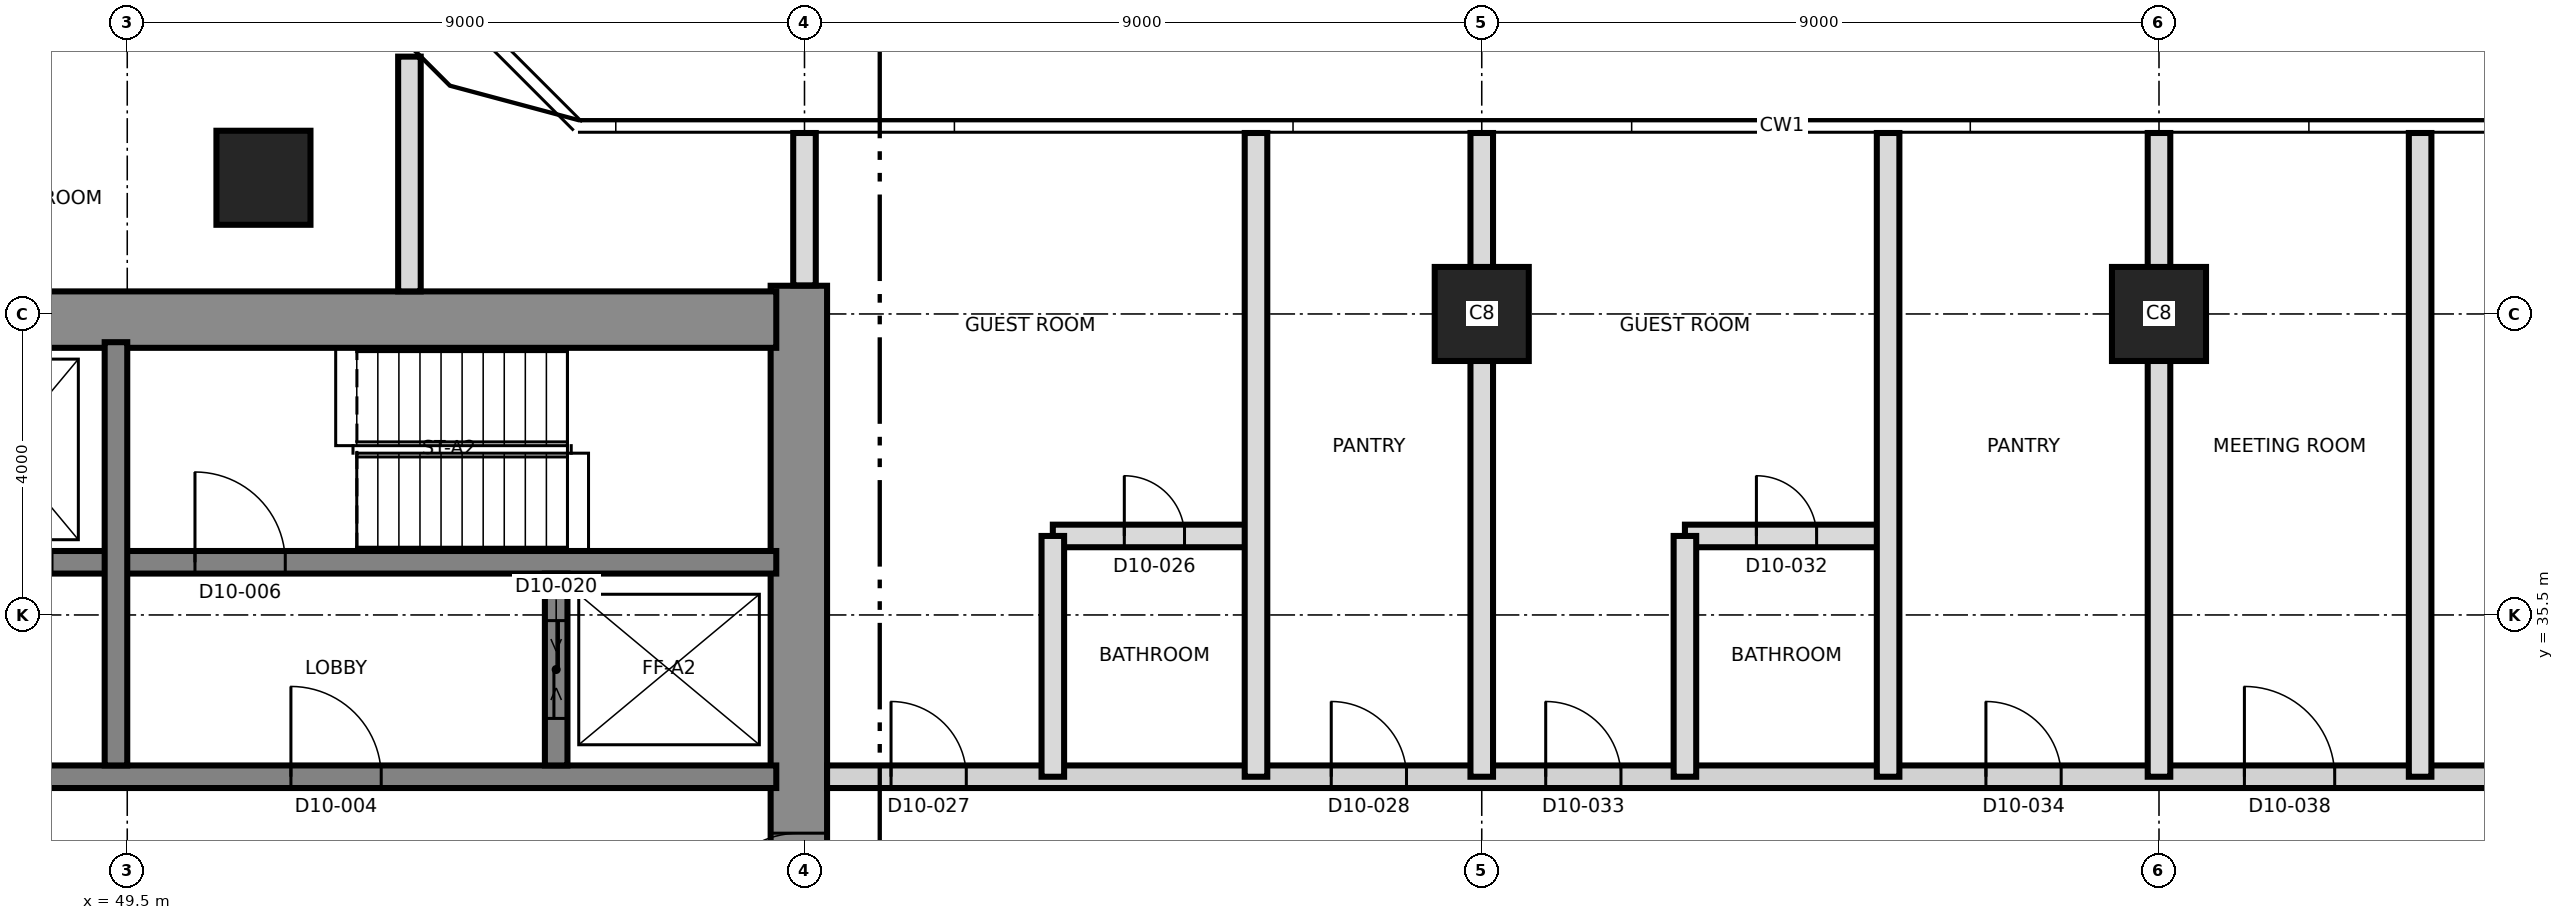
"""IFC4 building model, lengths in metres.
Left out: names, types, materials, properties, quantities, classifications, styles, units other than length and angle.
Written with IfcOpenShell. Run it as: python <this file> out.ifc"""

import sys

from ifc_helpers import new_model, si_unit, direction, frame, frame_2d, origin, origin_2d, place, context, subcontext, project, spatial, rectangle, extrude, element, fill, save


model = new_model("IFC4")
c1 = context("Model", 3, precision=1e-05, world=origin(), true_north=direction((0.0, 1.0)))
c2 = subcontext(c1, "Body", "Model", "MODEL_VIEW")
j1 = project(units=[si_unit("LENGTHUNIT", "METRE"), si_unit("PLANEANGLEUNIT", "RADIAN")], contexts=[c1])
p1 = place(None, origin())
s1 = spatial("IfcSite", under=j1, at=p1, CompositionType="ELEMENT")
p2 = place(p1, origin())
s2 = spatial("IfcBuilding", under=s1, at=p2, CompositionType="ELEMENT")
p3 = place(p2, frame((0.0, 0.0, 120.4)))
s3 = spatial("IfcBuildingStorey", under=s2, at=p3, CompositionType="ELEMENT", Elevation=120.4)
p4 = place(p3, frame((58.425, 21.125, 0.0), z_axis=(0.0, 0.0, 1.0), x_axis=(0.0, 1.0, 0.0)))
e1 = element("IfcWall", 1, at=p4, inside=s3, PredefinedType="SHEAR", context=c2, shape_type="SweptSolid", body=[
    extrude(rectangle(XDim=18.75, YDim=0.75, at=frame_2d((9.375, 0.0))), origin(), (0.0, 0.0, 1.0), 3.7),
])
p5 = place(p4, frame((10.275, 0.0, 0.0)))
e2 = element("IfcOpeningElement", 2, at=p5, cuts=e1, PredefinedType="OPENING", context=c2, shape_type="SweptSolid", body=[
    extrude(rectangle(XDim=1.2, YDim=2.1, at=frame_2d((0.6, 1.05))), frame((0.0, 0.385, 0.0), z_axis=(0.0, -1.0, 0.0), x_axis=(1.0, 0.0, 0.0)), (0.0, 0.0, 1.0), 0.77),
])
p6 = place(p3, frame((31.125, 39.425, 0.0), z_axis=(0.0, 0.0, 1.0), x_axis=(1.0, 0.0, 0.0)))
e3 = element("IfcWall", 3, at=p6, inside=s3, PredefinedType="SHEAR", context=c2, shape_type="SweptSolid", body=[
    extrude(rectangle(XDim=27.0, YDim=0.75, at=frame_2d((13.5, 0.0))), origin(), (0.0, 0.0, 1.0), 3.7),
])
p7 = place(p6, frame((10.575, 0.0, 0.0)))
e4 = element("IfcOpeningElement", 4, at=p7, cuts=e3, PredefinedType="OPENING", context=c2, shape_type="SweptSolid", body=[
    extrude(rectangle(XDim=1.2, YDim=2.1, at=frame_2d((0.6, 1.05))), frame((0.0, 0.385, 0.0), z_axis=(0.0, -1.0, 0.0), x_axis=(1.0, 0.0, 0.0)), (0.0, 0.0, 1.0), 0.77),
])
p8 = place(p3, frame((31.875, 33.35, 0.0), z_axis=(0.0, 0.0, 1.0), x_axis=(1.0, 0.0, 0.0)))
e5 = element("IfcWall", 5, at=p8, inside=s3, PredefinedType="SHEAR", context=c2, shape_type="SweptSolid", body=[
    extrude(rectangle(XDim=26.25, YDim=0.3, at=frame_2d((13.125, 0.0))), origin(), (0.0, 0.0, 1.0), 3.7),
])
p9 = place(p8, frame((13.775, 0.0, 0.0)))
e6 = element("IfcOpeningElement", 6, at=p9, cuts=e5, PredefinedType="OPENING", context=c2, shape_type="SweptSolid", body=[
    extrude(rectangle(XDim=1.4, YDim=2.1, at=frame_2d((0.7, 1.05))), frame((0.0, 0.16, 0.0), z_axis=(0.0, -1.0, 0.0), x_axis=(1.0, 0.0, 0.0)), (0.0, 0.0, 1.0), 0.32),
])
p10 = place(p8, frame((5.25, 0.0, 0.0)))
e7 = element("IfcOpeningElement", 7, at=p10, cuts=e5, PredefinedType="OPENING", context=c2, shape_type="SweptSolid", body=[
    extrude(rectangle(XDim=1.2, YDim=2.1, at=frame_2d((0.6, 1.05))), frame((0.0, 0.16, 0.0), z_axis=(0.0, -1.0, 0.0), x_axis=(1.0, 0.0, 0.0)), (0.0, 0.0, 1.0), 0.32),
])
p11 = place(p8, frame((19.8, 0.0, 0.0)))
e8 = element("IfcOpeningElement", 8, at=p11, cuts=e5, PredefinedType="OPENING", context=c2, shape_type="SweptSolid", body=[
    extrude(rectangle(XDim=1.2, YDim=2.1, at=frame_2d((0.6, 1.05))), frame((0.0, 0.16, 0.0), z_axis=(0.0, -1.0, 0.0), x_axis=(1.0, 0.0, 0.0)), (0.0, 0.0, 1.0), 0.32),
])
p12 = place(p3, frame((43.5, 36.2, 0.0), z_axis=(0.0, 0.0, 1.0), x_axis=(1.0, 0.0, 0.0)))
e9 = element("IfcWall", 9, at=p12, inside=s3, PredefinedType="SHEAR", context=c2, shape_type="SweptSolid", body=[
    extrude(rectangle(XDim=14.625, YDim=0.3, at=frame_2d((7.312, 0.0))), origin(), (0.0, 0.0, 1.0), 3.7),
])
p13 = place(p12, frame((6.9, 0.0, 0.0)))
e10 = element("IfcOpeningElement", 10, at=p13, cuts=e9, PredefinedType="OPENING", context=c2, shape_type="SweptSolid", body=[
    extrude(rectangle(XDim=1.2, YDim=2.1, at=frame_2d((0.6, 1.05))), frame((0.0, 0.16, 0.0), z_axis=(0.0, -1.0, 0.0), x_axis=(1.0, 0.0, 0.0)), (0.0, 0.0, 1.0), 0.32),
])
p14 = place(p12, frame((0.7, 0.0, 0.0)))
e11 = element("IfcOpeningElement", 11, at=p14, cuts=e9, PredefinedType="OPENING", context=c2, shape_type="SweptSolid", body=[
    extrude(rectangle(XDim=1.3, YDim=2.4, at=frame_2d((0.65, 1.2))), frame((0.0, 0.16, 0.0), z_axis=(0.0, -1.0, 0.0), x_axis=(1.0, 0.0, 0.0)), (0.0, 0.0, 1.0), 0.32),
])
p15 = place(p12, frame((3.7, 0.0, 0.0)))
e12 = element("IfcOpeningElement", 12, at=p15, cuts=e9, PredefinedType="OPENING", context=c2, shape_type="SweptSolid", body=[
    extrude(rectangle(XDim=1.3, YDim=2.4, at=frame_2d((0.65, 1.2))), frame((0.0, 0.16, 0.0), z_axis=(0.0, -1.0, 0.0), x_axis=(1.0, 0.0, 0.0)), (0.0, 0.0, 1.0), 0.32),
])
p16 = place(p3, frame((49.35, 33.5, 0.0), z_axis=(0.0, 0.0, 1.0), x_axis=(0.0, 1.0, 0.0)))
e13 = element("IfcWall", 13, at=p16, inside=s3, PredefinedType="SHEAR", context=c2, shape_type="SweptSolid", body=[
    extrude(rectangle(XDim=5.625, YDim=0.3, at=frame_2d((2.812, 0.0))), origin(), (0.0, 0.0, 1.0), 3.7),
])
p17 = place(p3, frame((55.2, 33.5, 0.0), z_axis=(0.0, 0.0, 1.0), x_axis=(0.0, 1.0, 0.0)))
e14 = element("IfcWall", 14, at=p17, inside=s3, PredefinedType="SHEAR", context=c2, shape_type="SweptSolid", body=[
    extrude(rectangle(XDim=2.55, YDim=0.3, at=frame_2d((1.275, 0.0))), origin(), (0.0, 0.0, 1.0), 3.7),
])
p18 = place(p17, frame((0.625, 0.0, 0.0)))
e15 = element("IfcOpeningElement", 15, at=p18, cuts=e14, PredefinedType="OPENING", context=c2, shape_type="SweptSolid", body=[
    extrude(rectangle(XDim=1.3, YDim=2.4, at=frame_2d((0.65, 1.2))), frame((0.0, 0.16, 0.0), z_axis=(0.0, -1.0, 0.0), x_axis=(1.0, 0.0, 0.0)), (0.0, 0.0, 1.0), 0.32),
])
for number, where, z_axis, x_axis in (
    (16, (67.5, 39.5, 0.0), (0.0, 0.0, 1.0), (1.0, 0.0, 0.0)),
    (17, (76.5, 39.5, 0.0), (0.0, 0.0, 1.0), (1.0, 0.0, 0.0)),
    (18, (51.31, 41.31, 0.0), (0.0, 0.0, 1.0), (1.0, 0.0, 0.0)),
):
    element("IfcColumn", number, at=place(p3, frame(where, z_axis=z_axis, x_axis=x_axis)), inside=s3, PredefinedType="COLUMN", context=c2, shape_type="SweptSolid", body=[
        extrude(rectangle(XDim=1.25, YDim=1.25, at=origin_2d()), origin(), (0.0, 0.0, 1.0), 3.7),
    ])
p19 = place(p3, frame((58.8, 33.35, 0.0), z_axis=(0.0, 0.0, 1.0), x_axis=(1.0, 0.0, 0.0)))
e19 = element("IfcWall", 19, at=p19, inside=s3, PredefinedType="PARTITIONING", context=c2, shape_type="SweptSolid", body=[
    extrude(rectangle(XDim=26.53, YDim=0.3, at=frame_2d((13.265, 0.0))), origin(), (0.0, 0.0, 1.0), 3.4),
])
p20 = place(p19, frame((0.85, 0.0, 0.0)))
e20 = element("IfcOpeningElement", 20, at=p20, cuts=e19, PredefinedType="OPENING", context=c2, shape_type="SweptSolid", body=[
    extrude(rectangle(XDim=1.0, YDim=2.1, at=frame_2d((0.5, 1.05))), frame((0.0, 0.16, 0.0), z_axis=(0.0, -1.0, 0.0), x_axis=(1.0, 0.0, 0.0)), (0.0, 0.0, 1.0), 0.32),
])
p21 = place(p19, frame((6.7, 0.0, 0.0)))
e21 = element("IfcOpeningElement", 21, at=p21, cuts=e19, PredefinedType="OPENING", context=c2, shape_type="SweptSolid", body=[
    extrude(rectangle(XDim=1.0, YDim=2.1, at=frame_2d((0.5, 1.05))), frame((0.0, 0.16, 0.0), z_axis=(0.0, -1.0, 0.0), x_axis=(1.0, 0.0, 0.0)), (0.0, 0.0, 1.0), 0.32),
])
p22 = place(p19, frame((9.55, 0.0, 0.0)))
e22 = element("IfcOpeningElement", 22, at=p22, cuts=e19, PredefinedType="OPENING", context=c2, shape_type="SweptSolid", body=[
    extrude(rectangle(XDim=1.0, YDim=2.1, at=frame_2d((0.5, 1.05))), frame((0.0, 0.16, 0.0), z_axis=(0.0, -1.0, 0.0), x_axis=(1.0, 0.0, 0.0)), (0.0, 0.0, 1.0), 0.32),
])
p23 = place(p19, frame((15.4, 0.0, 0.0)))
e23 = element("IfcOpeningElement", 23, at=p23, cuts=e19, PredefinedType="OPENING", context=c2, shape_type="SweptSolid", body=[
    extrude(rectangle(XDim=1.0, YDim=2.1, at=frame_2d((0.5, 1.05))), frame((0.0, 0.16, 0.0), z_axis=(0.0, -1.0, 0.0), x_axis=(1.0, 0.0, 0.0)), (0.0, 0.0, 1.0), 0.32),
])
p24 = place(p19, frame((18.835, 0.0, 0.0)))
e24 = element("IfcOpeningElement", 24, at=p24, cuts=e19, PredefinedType="OPENING", context=c2, shape_type="SweptSolid", body=[
    extrude(rectangle(XDim=1.2, YDim=2.1, at=frame_2d((0.6, 1.05))), frame((0.0, 0.16, 0.0), z_axis=(0.0, -1.0, 0.0), x_axis=(1.0, 0.0, 0.0)), (0.0, 0.0, 1.0), 0.32),
])
p25 = place(p19, frame((22.085, 0.0, 0.0)))
e25 = element("IfcOpeningElement", 25, at=p25, cuts=e19, PredefinedType="OPENING", context=c2, shape_type="SweptSolid", body=[
    extrude(rectangle(XDim=1.0, YDim=2.1, at=frame_2d((0.5, 1.05))), frame((0.0, 0.16, 0.0), z_axis=(0.0, -1.0, 0.0), x_axis=(1.0, 0.0, 0.0)), (0.0, 0.0, 1.0), 0.32),
])
p26 = place(p3, frame((61.8, 36.55, 0.0), z_axis=(0.0, 0.0, 1.0), x_axis=(1.0, 0.0, 0.0)))
e26 = element("IfcWall", 26, at=p26, inside=s3, PredefinedType="PARTITIONING", context=c2, shape_type="SweptSolid", body=[
    extrude(rectangle(XDim=2.7, YDim=0.3, at=frame_2d((1.35, 0.0))), origin(), (0.0, 0.0, 1.0), 3.4),
])
p27 = place(p26, frame((0.95, 0.0, 0.0)))
e27 = element("IfcOpeningElement", 27, at=p27, cuts=e26, PredefinedType="OPENING", context=c2, shape_type="SweptSolid", body=[
    extrude(rectangle(XDim=0.8, YDim=2.1, at=frame_2d((0.4, 1.05))), frame((0.0, 0.16, 0.0), z_axis=(0.0, -1.0, 0.0), x_axis=(1.0, 0.0, 0.0)), (0.0, 0.0, 1.0), 0.32),
])
p28 = place(p3, frame((70.2, 36.55, 0.0), z_axis=(0.0, 0.0, 1.0), x_axis=(1.0, 0.0, 0.0)))
e28 = element("IfcWall", 28, at=p28, inside=s3, PredefinedType="PARTITIONING", context=c2, shape_type="SweptSolid", body=[
    extrude(rectangle(XDim=2.7, YDim=0.3, at=frame_2d((1.35, 0.0))), origin(), (0.0, 0.0, 1.0), 3.4),
])
p29 = place(p28, frame((0.95, 0.0, 0.0)))
e29 = element("IfcOpeningElement", 29, at=p29, cuts=e28, PredefinedType="OPENING", context=c2, shape_type="SweptSolid", body=[
    extrude(rectangle(XDim=0.8, YDim=2.1, at=frame_2d((0.4, 1.05))), frame((0.0, 0.16, 0.0), z_axis=(0.0, -1.0, 0.0), x_axis=(1.0, 0.0, 0.0)), (0.0, 0.0, 1.0), 0.32),
])
p30 = place(p3, frame((53.25, 39.8, 0.0), z_axis=(0.0, 0.0, 1.0), x_axis=(0.0, 1.0, 0.0)))
e30 = element("IfcWall", 30, at=p30, inside=s3, PredefinedType="PARTITIONING", context=c2, shape_type="SweptSolid", body=[
    extrude(rectangle(XDim=3.12, YDim=0.3, at=frame_2d((1.56, 0.0))), origin(), (0.0, 0.0, 1.0), 3.35),
])
p31 = place(p3, frame((58.5, 39.88, 0.0), z_axis=(0.0, 0.0, 1.0), x_axis=(0.0, 1.0, 0.0)))
e31 = element("IfcWall", 31, at=p31, inside=s3, PredefinedType="PARTITIONING", context=c2, shape_type="SweptSolid", body=[
    extrude(rectangle(XDim=2.025, YDim=0.3, at=frame_2d((1.013, 0.0))), origin(), (0.0, 0.0, 1.0), 3.35),
])
p32 = place(p3, frame((61.8, 33.35, 0.0), z_axis=(0.0, 0.0, 1.0), x_axis=(0.0, 1.0, 0.0)))
e32 = element("IfcWall", 32, at=p32, inside=s3, PredefinedType="PARTITIONING", context=c2, shape_type="SweptSolid", body=[
    extrude(rectangle(XDim=3.2, YDim=0.3, at=frame_2d((1.6, 0.0))), origin(), (0.0, 0.0, 1.0), 3.4),
])
for number, where, z_axis, x_axis in (
    (33, (64.5, 33.35, 0.0), (0.0, 0.0, 1.0), (0.0, 1.0, 0.0)),
    (34, (67.5, 33.35, 0.0), (0.0, 0.0, 1.0), (0.0, 1.0, 0.0)),
):
    element("IfcWall", number, at=place(p3, frame(where, z_axis=z_axis, x_axis=x_axis)), inside=s3, PredefinedType="PARTITIONING", context=c2, shape_type="SweptSolid", body=[
        extrude(rectangle(XDim=8.555, YDim=0.3, at=frame_2d((4.277, 0.0))), origin(), (0.0, 0.0, 1.0), 3.35),
    ])
p33 = place(p3, frame((70.2, 33.35, 0.0), z_axis=(0.0, 0.0, 1.0), x_axis=(0.0, 1.0, 0.0)))
e35 = element("IfcWall", 35, at=p33, inside=s3, PredefinedType="PARTITIONING", context=c2, shape_type="SweptSolid", body=[
    extrude(rectangle(XDim=3.2, YDim=0.3, at=frame_2d((1.6, 0.0))), origin(), (0.0, 0.0, 1.0), 3.4),
])
for number, where, z_axis, x_axis in (
    (36, (72.9, 33.35, 0.0), (0.0, 0.0, 1.0), (0.0, 1.0, 0.0)),
    (37, (76.5, 33.35, 0.0), (0.0, 0.0, 1.0), (0.0, 1.0, 0.0)),
    (38, (79.97, 33.35, 0.0), (0.0, 0.0, 1.0), (0.0, 1.0, 0.0)),
):
    element("IfcWall", number, at=place(p3, frame(where, z_axis=z_axis, x_axis=x_axis)), inside=s3, PredefinedType="PARTITIONING", context=c2, shape_type="SweptSolid", body=[
        extrude(rectangle(XDim=8.555, YDim=0.3, at=frame_2d((4.277, 0.0))), origin(), (0.0, 0.0, 1.0), 3.35),
    ])
p34 = place(p11, origin())
e39 = element("IfcDoor", 39, at=p34, inside=s3, OperationType="SINGLE_SWING_RIGHT", PredefinedType="DOOR", context=c2, shape_type="SweptSolid", body=[
    extrude(rectangle(XDim=1.2, YDim=2.1, at=frame_2d((0.6, 1.05))), frame((0.0, 0.025, 0.0), z_axis=(0.0, -1.0, 0.0), x_axis=(1.0, 0.0, 0.0)), (0.0, 0.0, 1.0), 0.05),
])
fill(e8, e39)
p35 = place(p13, origin())
e40 = element("IfcDoor", 40, at=p35, inside=s3, OperationType="SINGLE_SWING_LEFT", PredefinedType="DOOR", context=c2, shape_type="SweptSolid", body=[
    extrude(rectangle(XDim=1.2, YDim=2.1, at=frame_2d((0.6, 1.05))), frame((0.0, 0.025, 0.0), z_axis=(0.0, -1.0, 0.0), x_axis=(1.0, 0.0, 0.0)), (0.0, 0.0, 1.0), 0.05),
])
fill(e10, e40)
p36 = place(p5, origin())
e41 = element("IfcDoor", 41, at=p36, inside=s3, OperationType="SINGLE_SWING_LEFT", PredefinedType="DOOR", context=c2, shape_type="SweptSolid", body=[
    extrude(rectangle(XDim=1.2, YDim=2.1, at=frame_2d((0.6, 1.05))), frame((0.0, 0.025, 0.0), z_axis=(0.0, -1.0, 0.0), x_axis=(1.0, 0.0, 0.0)), (0.0, 0.0, 1.0), 0.05),
])
fill(e2, e41)
p37 = place(p18, origin())
e42 = element("IfcDoor", 42, at=p37, inside=s3, OperationType="SLIDING_TO_LEFT", PredefinedType="DOOR", context=c2, shape_type="SweptSolid", body=[
    extrude(rectangle(XDim=1.3, YDim=2.4, at=frame_2d((0.65, 1.2))), frame((0.0, 0.025, 0.0), z_axis=(0.0, -1.0, 0.0), x_axis=(1.0, 0.0, 0.0)), (0.0, 0.0, 1.0), 0.05),
])
fill(e15, e42)
p38 = place(p27, origin())
e43 = element("IfcDoor", 43, at=p38, inside=s3, OperationType="SINGLE_SWING_LEFT", PredefinedType="DOOR", context=c2, shape_type="SweptSolid", body=[
    extrude(rectangle(XDim=0.8, YDim=2.1, at=frame_2d((0.4, 1.05))), frame((0.0, 0.025, 0.0), z_axis=(0.0, -1.0, 0.0), x_axis=(1.0, 0.0, 0.0)), (0.0, 0.0, 1.0), 0.05),
])
fill(e27, e43)
p39 = place(p20, origin())
e44 = element("IfcDoor", 44, at=p39, inside=s3, OperationType="SINGLE_SWING_LEFT", PredefinedType="DOOR", context=c2, shape_type="SweptSolid", body=[
    extrude(rectangle(XDim=1.0, YDim=2.1, at=frame_2d((0.5, 1.05))), frame((0.0, 0.025, 0.0), z_axis=(0.0, -1.0, 0.0), x_axis=(1.0, 0.0, 0.0)), (0.0, 0.0, 1.0), 0.05),
])
fill(e20, e44)
p40 = place(p21, origin())
e45 = element("IfcDoor", 45, at=p40, inside=s3, OperationType="SINGLE_SWING_RIGHT", PredefinedType="DOOR", context=c2, shape_type="SweptSolid", body=[
    extrude(rectangle(XDim=1.0, YDim=2.1, at=frame_2d((0.5, 1.05))), frame((0.0, 0.025, 0.0), z_axis=(0.0, -1.0, 0.0), x_axis=(1.0, 0.0, 0.0)), (0.0, 0.0, 1.0), 0.05),
])
fill(e21, e45)
p41 = place(p29, origin())
e46 = element("IfcDoor", 46, at=p41, inside=s3, OperationType="SINGLE_SWING_LEFT", PredefinedType="DOOR", context=c2, shape_type="SweptSolid", body=[
    extrude(rectangle(XDim=0.8, YDim=2.1, at=frame_2d((0.4, 1.05))), frame((0.0, 0.025, 0.0), z_axis=(0.0, -1.0, 0.0), x_axis=(1.0, 0.0, 0.0)), (0.0, 0.0, 1.0), 0.05),
])
fill(e29, e46)
p42 = place(p22, origin())
e47 = element("IfcDoor", 47, at=p42, inside=s3, OperationType="SINGLE_SWING_LEFT", PredefinedType="DOOR", context=c2, shape_type="SweptSolid", body=[
    extrude(rectangle(XDim=1.0, YDim=2.1, at=frame_2d((0.5, 1.05))), frame((0.0, 0.025, 0.0), z_axis=(0.0, -1.0, 0.0), x_axis=(1.0, 0.0, 0.0)), (0.0, 0.0, 1.0), 0.05),
])
fill(e22, e47)
p43 = place(p23, origin())
e48 = element("IfcDoor", 48, at=p43, inside=s3, OperationType="SINGLE_SWING_RIGHT", PredefinedType="DOOR", context=c2, shape_type="SweptSolid", body=[
    extrude(rectangle(XDim=1.0, YDim=2.1, at=frame_2d((0.5, 1.05))), frame((0.0, 0.025, 0.0), z_axis=(0.0, -1.0, 0.0), x_axis=(1.0, 0.0, 0.0)), (0.0, 0.0, 1.0), 0.05),
])
fill(e23, e48)
p44 = place(p24, origin())
e49 = element("IfcDoor", 49, at=p44, inside=s3, OperationType="SINGLE_SWING_LEFT", PredefinedType="DOOR", context=c2, shape_type="SweptSolid", body=[
    extrude(rectangle(XDim=1.2, YDim=2.1, at=frame_2d((0.6, 1.05))), frame((0.0, 0.025, 0.0), z_axis=(0.0, -1.0, 0.0), x_axis=(1.0, 0.0, 0.0)), (0.0, 0.0, 1.0), 0.05),
])
fill(e24, e49)
save(model, sys.argv[1])
